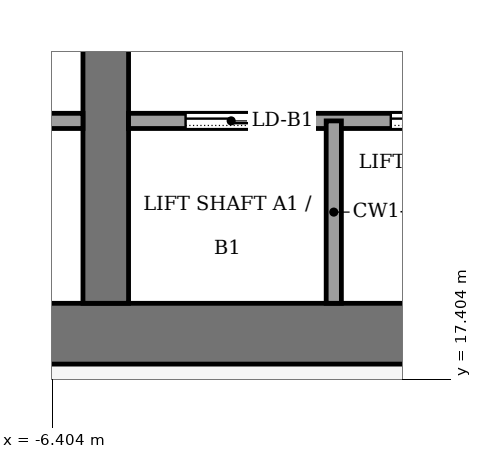
"""IFC4 building model, lengths in metres.
Left out: names, types, materials, properties, quantities, classifications, styles, units other than length and angle.
Written with IfcOpenShell. Run it as: python <this file> out.ifc"""

import sys

from ifc_helpers import new_model, si_unit, direction, frame, frame_2d, origin, place, context, subcontext, project, spatial, rectangle, extrude, element, fill, save


model = new_model("IFC4")
c1 = context("Model", 3, precision=1e-05, world=origin(), true_north=direction((0.0, 1.0)))
c2 = subcontext(c1, "Body", "Model", "MODEL_VIEW")
j1 = project(units=[si_unit("LENGTHUNIT", "METRE"), si_unit("PLANEANGLEUNIT", "RADIAN")], contexts=[c1])
p1 = place(None, origin())
s1 = spatial("IfcSite", under=j1, at=p1, CompositionType="ELEMENT")
p2 = place(p1, origin())
s2 = spatial("IfcBuilding", under=s1, at=p2, CompositionType="ELEMENT")
p3 = place(p2, frame((0.0, 0.0, 250.0)))
s3 = spatial("IfcBuildingStorey", under=s2, at=p3, CompositionType="ELEMENT", Elevation=250.0)
p4 = place(p3, frame((-13.4, 18.0, -0.13), z_axis=(0.0, 0.0, 1.0), x_axis=(1.0, 0.0, 0.0)))
e1 = element("IfcWall", 1, at=p4, inside=s3, PredefinedType="SHEAR", context=c2, shape_type="SweptSolid", body=[
    extrude(rectangle(XDim=26.8, YDim=0.8, at=frame_2d((13.4, 0.0))), origin(), (0.0, 0.0, 1.0), 4.0),
])
p5 = place(p3, frame((-5.7, 18.4, -0.13), z_axis=(0.0, 0.0, 1.0), x_axis=(0.0, 1.0, 0.0)))
e2 = element("IfcWall", 2, at=p5, inside=s3, PredefinedType="SHEAR", context=c2, shape_type="SweptSolid", body=[
    extrude(rectangle(XDim=19.2, YDim=0.6, at=frame_2d((9.6, 0.0))), origin(), (0.0, 0.0, 1.0), 4.0),
])
p6 = place(p5, frame((8.35, 0.0, 0.13)))
e3 = element("IfcOpeningElement", 3, at=p6, cuts=e2, PredefinedType="OPENING", context=c2, shape_type="SweptSolid", body=[
    extrude(rectangle(XDim=0.9, YDim=2.1, at=frame_2d((0.45, 1.05))), frame((0.0, 0.31, 0.0), z_axis=(0.0, -1.0, 0.0), x_axis=(1.0, 0.0, 0.0)), (0.0, 0.0, 1.0), 0.62),
])
p7 = place(p3, frame((-12.6, 20.8, 0.0), z_axis=(0.0, 0.0, 1.0), x_axis=(1.0, 0.0, 0.0)))
e4 = element("IfcWall", 4, at=p7, inside=s3, PredefinedType="PARTITIONING", context=c2, shape_type="SweptSolid", body=[
    extrude(rectangle(XDim=6.6, YDim=0.2, at=frame_2d((3.3, 0.0))), origin(), (0.0, 0.0, 1.0), 3.87),
])
p8 = place(p7, frame((2.8, 0.0, 0.0)))
e5 = element("IfcOpeningElement", 5, at=p8, cuts=e4, PredefinedType="OPENING", context=c2, shape_type="SweptSolid", body=[
    extrude(rectangle(XDim=1.0, YDim=2.1, at=frame_2d((0.5, 1.05))), frame((0.0, 0.11, 0.0), z_axis=(0.0, -1.0, 0.0), x_axis=(1.0, 0.0, 0.0)), (0.0, 0.0, 1.0), 0.22),
])
p9 = place(p3, frame((-5.4, 20.8, 0.0), z_axis=(0.0, 0.0, 1.0), x_axis=(1.0, 0.0, 0.0)))
e6 = element("IfcWall", 6, at=p9, inside=s3, PredefinedType="PARTITIONING", context=c2, shape_type="SweptSolid", body=[
    extrude(rectangle(XDim=10.8, YDim=0.2, at=frame_2d((5.4, 0.0))), origin(), (0.0, 0.0, 1.0), 3.87),
])
p10 = place(p9, frame((0.75, 0.0, 0.0)))
e7 = element("IfcOpeningElement", 7, at=p10, cuts=e6, PredefinedType="OPENING", context=c2, shape_type="SweptSolid", body=[
    extrude(rectangle(XDim=1.2, YDim=2.2, at=frame_2d((0.6, 1.1))), frame((0.0, 0.11, 0.0), z_axis=(0.0, -1.0, 0.0), x_axis=(1.0, 0.0, 0.0)), (0.0, 0.0, 1.0), 0.22),
])
p11 = place(p9, frame((3.45, 0.0, 0.0)))
e8 = element("IfcOpeningElement", 8, at=p11, cuts=e6, PredefinedType="OPENING", context=c2, shape_type="SweptSolid", body=[
    extrude(rectangle(XDim=1.2, YDim=2.2, at=frame_2d((0.6, 1.1))), frame((0.0, 0.11, 0.0), z_axis=(0.0, -1.0, 0.0), x_axis=(1.0, 0.0, 0.0)), (0.0, 0.0, 1.0), 0.22),
])
p12 = place(p9, frame((6.15, 0.0, 0.0)))
e9 = element("IfcOpeningElement", 9, at=p12, cuts=e6, PredefinedType="OPENING", context=c2, shape_type="SweptSolid", body=[
    extrude(rectangle(XDim=1.2, YDim=2.2, at=frame_2d((0.6, 1.1))), frame((0.0, 0.11, 0.0), z_axis=(0.0, -1.0, 0.0), x_axis=(1.0, 0.0, 0.0)), (0.0, 0.0, 1.0), 0.22),
])
p13 = place(p9, frame((8.85, 0.0, 0.0)))
e10 = element("IfcOpeningElement", 10, at=p13, cuts=e6, PredefinedType="OPENING", context=c2, shape_type="SweptSolid", body=[
    extrude(rectangle(XDim=1.2, YDim=2.2, at=frame_2d((0.6, 1.1))), frame((0.0, 0.11, 0.0), z_axis=(0.0, -1.0, 0.0), x_axis=(1.0, 0.0, 0.0)), (0.0, 0.0, 1.0), 0.22),
])
p14 = place(p3, frame((-2.7, 18.4, 0.0), z_axis=(0.0, 0.0, 1.0), x_axis=(0.0, 1.0, 0.0)))
e11 = element("IfcWall", 11, at=p14, inside=s3, PredefinedType="PARTITIONING", context=c2, shape_type="SweptSolid", body=[
    extrude(rectangle(XDim=2.4, YDim=0.2, at=frame_2d((1.2, 0.0))), origin(), (0.0, 0.0, 1.0), 3.87),
])
p15 = place(p10, origin())
e12 = element("IfcDoor", 12, at=p15, inside=s3, OperationType="SLIDING_TO_LEFT", PredefinedType="DOOR", context=c2, shape_type="SweptSolid", body=[
    extrude(rectangle(XDim=1.2, YDim=2.2, at=frame_2d((0.6, 1.1))), frame((0.0, 0.025, 0.0), z_axis=(0.0, -1.0, 0.0), x_axis=(1.0, 0.0, 0.0)), (0.0, 0.0, 1.0), 0.05),
])
fill(e7, e12)
p16 = place(p11, origin())
e13 = element("IfcDoor", 13, at=p16, inside=s3, OperationType="SLIDING_TO_LEFT", PredefinedType="DOOR", context=c2, shape_type="SweptSolid", body=[
    extrude(rectangle(XDim=1.2, YDim=2.2, at=frame_2d((0.6, 1.1))), frame((0.0, 0.025, 0.0), z_axis=(0.0, -1.0, 0.0), x_axis=(1.0, 0.0, 0.0)), (0.0, 0.0, 1.0), 0.05),
])
fill(e8, e13)
save(model, sys.argv[1])
